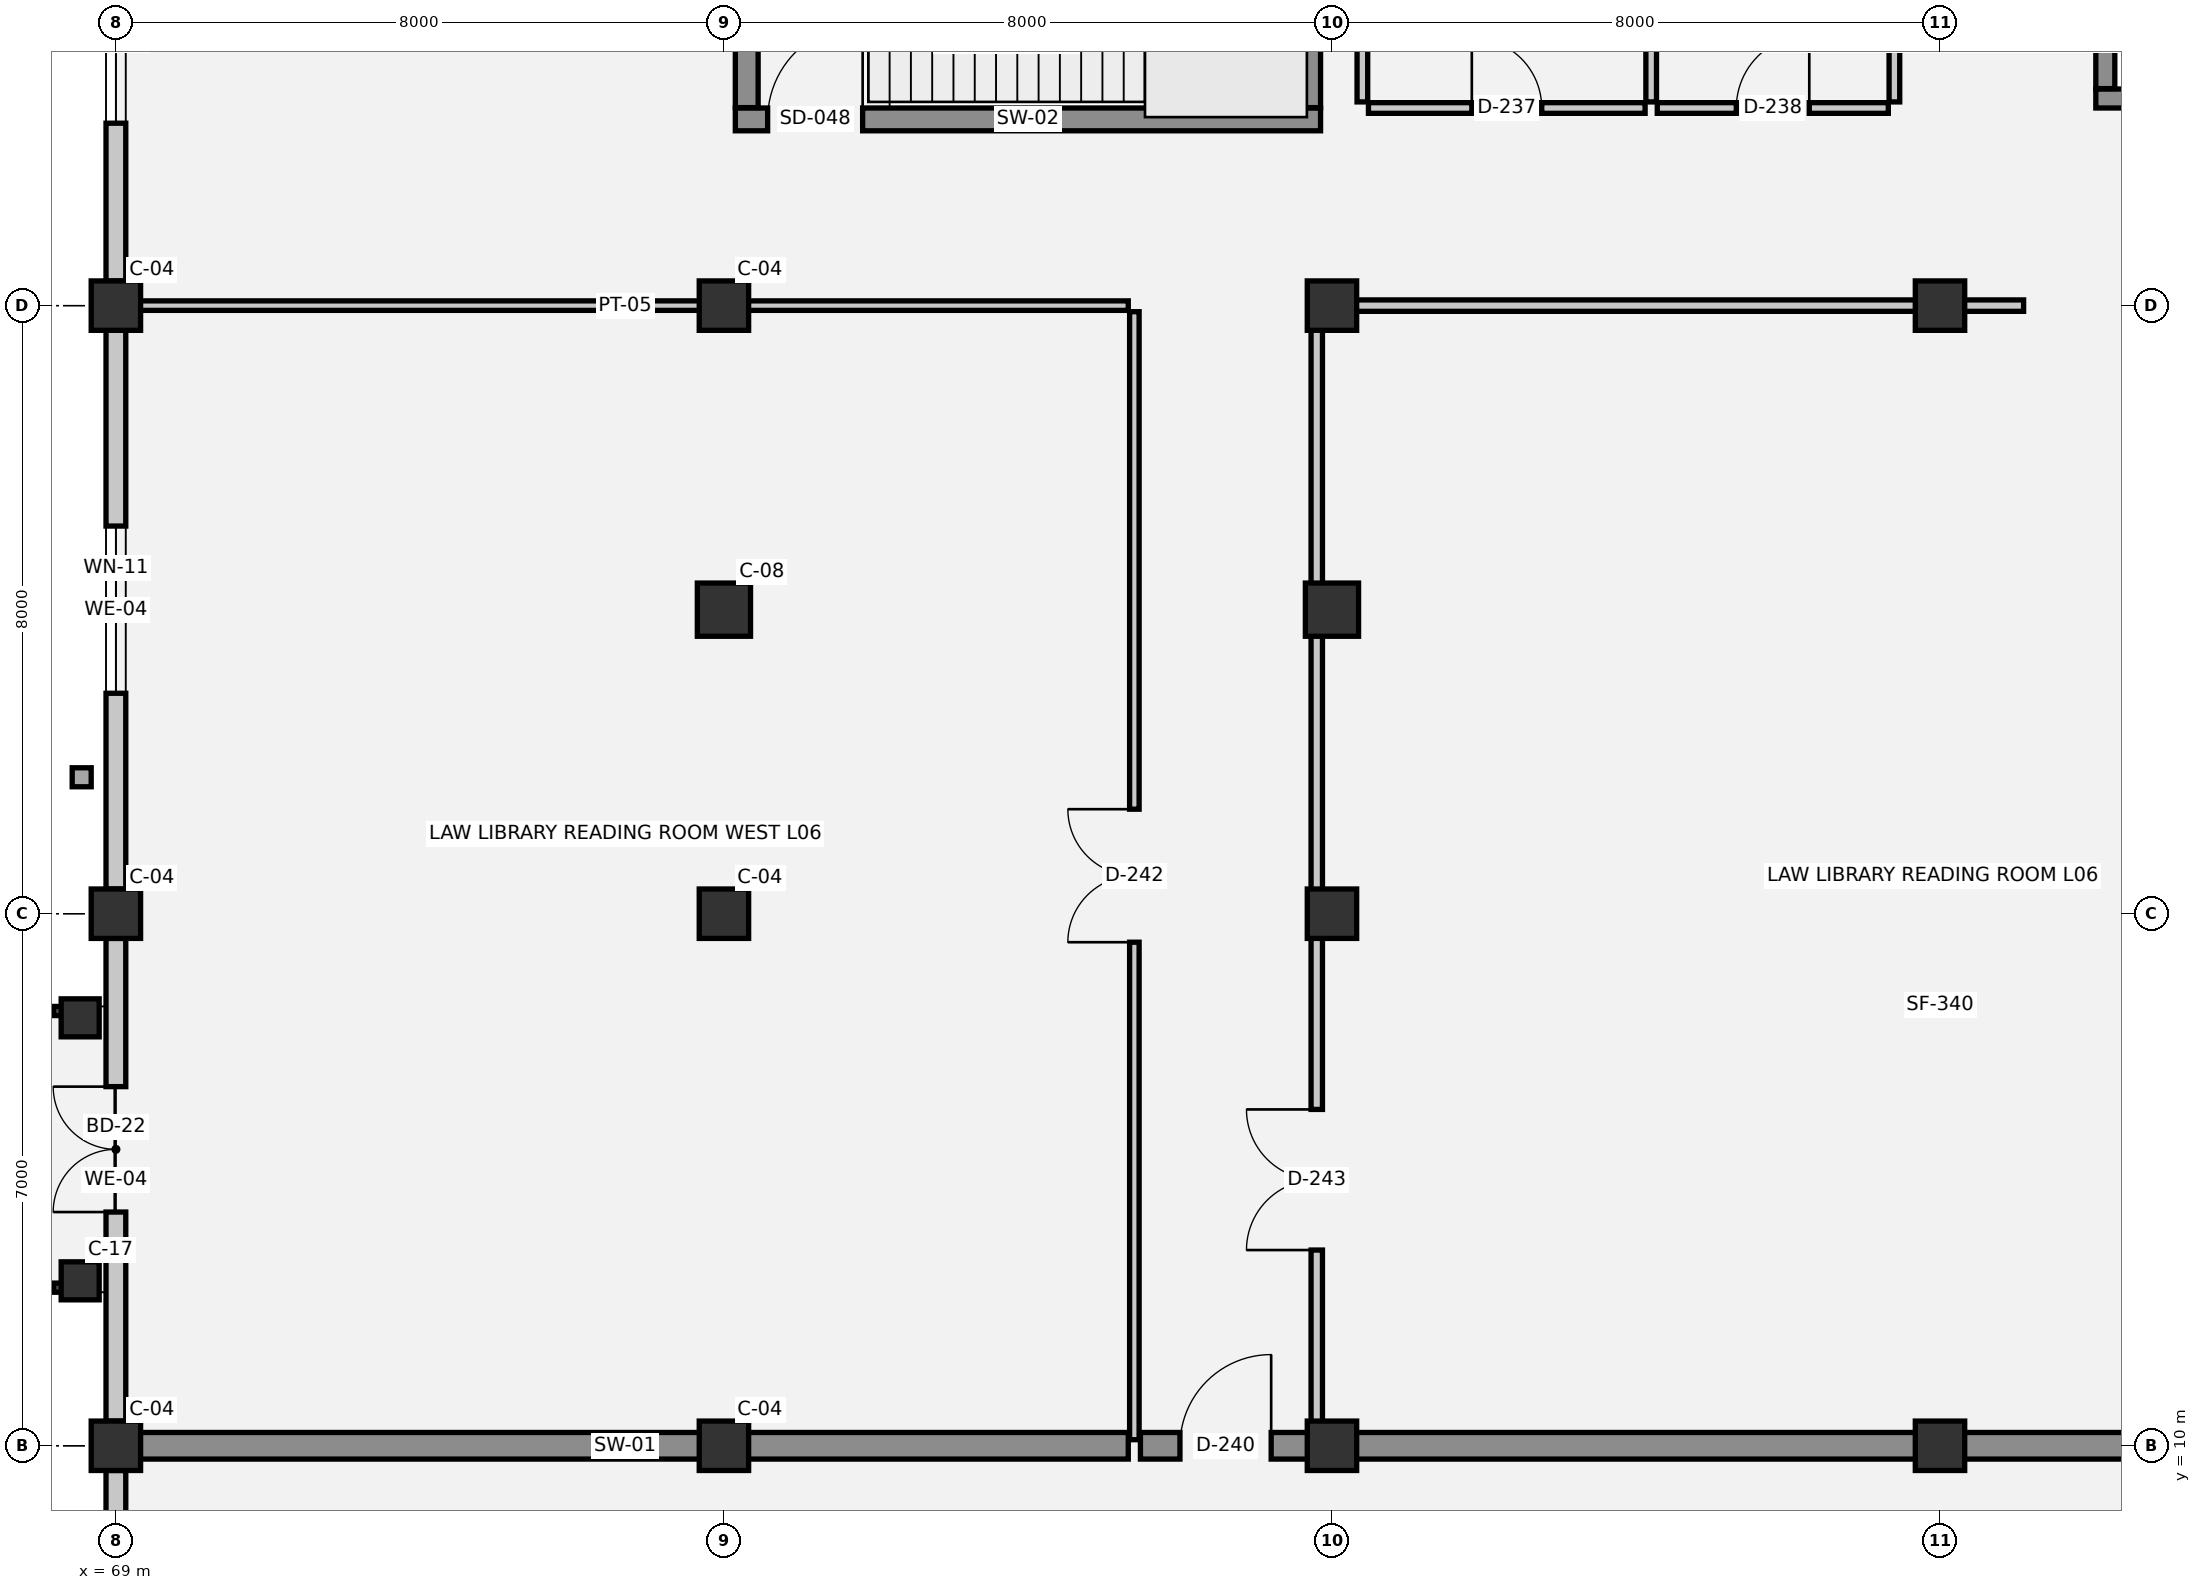
"""IFC4 building model, lengths in metres.
Left out: names, types, materials, properties, quantities, classifications, styles, units other than length and angle.
Written with IfcOpenShell. Run it as: python <this file> out.ifc"""

import sys

from ifc_helpers import new_model, si_unit, direction, frame, frame_2d, origin, origin_2d, place, context, subcontext, project, spatial, rectangle, circle, extrude, element, fill, save


model = new_model("IFC4")
c1 = context("Model", 3, precision=1e-05, world=origin(), true_north=direction((0.0, 1.0)))
c2 = subcontext(c1, "Body", "Model", "MODEL_VIEW")
j1 = project(units=[si_unit("LENGTHUNIT", "METRE"), si_unit("PLANEANGLEUNIT", "RADIAN")], contexts=[c1])
p1 = place(None, origin())
s1 = spatial("IfcSite", under=j1, at=p1, CompositionType="ELEMENT")
p2 = place(p1, origin())
s2 = spatial("IfcBuilding", under=s1, at=p2, CompositionType="ELEMENT")
p3 = place(p2, frame((0.0, 0.0, 9.9)))
s3 = spatial("IfcBuildingStorey", under=s2, at=p3, CompositionType="ELEMENT", Elevation=9.9)
for number, where, z_axis, x_axis in (
    (1, (69.0, 10.0, 0.0), (0.0, 0.0, 1.0), (1.0, 0.0, 0.0)),
    (2, (69.0, 17.0, 0.0), (0.0, 0.0, 1.0), (1.0, 0.0, 0.0)),
    (3, (69.0, 25.0, 0.0), (0.0, 0.0, 1.0), (1.0, 0.0, 0.0)),
    (4, (77.0, 10.0, 0.0), (0.0, 0.0, 1.0), (1.0, 0.0, 0.0)),
    (5, (77.0, 17.0, 0.0), (0.0, 0.0, 1.0), (1.0, 0.0, 0.0)),
    (6, (77.0, 25.0, 0.0), (0.0, 0.0, 1.0), (1.0, 0.0, 0.0)),
    (7, (85.0, 10.0, 0.0), (0.0, 0.0, 1.0), (1.0, 0.0, 0.0)),
    (8, (85.0, 17.0, 0.0), (0.0, 0.0, 1.0), (1.0, 0.0, 0.0)),
    (9, (85.0, 25.0, 0.0), (0.0, 0.0, 1.0), (1.0, 0.0, 0.0)),
    (10, (93.0, 10.0, 0.0), (0.0, 0.0, 1.0), (1.0, 0.0, 0.0)),
    (11, (93.0, 25.0, 0.0), (0.0, 0.0, 1.0), (1.0, 0.0, 0.0)),
):
    element("IfcColumn", number, at=place(p3, frame(where, z_axis=z_axis, x_axis=x_axis)), inside=s3, PredefinedType="COLUMN", context=c2, shape_type="SweptSolid", body=[
        extrude(rectangle(XDim=0.65, YDim=0.65, at=origin_2d()), origin(), (0.0, 0.0, 1.0), 4.5),
    ])
for number, where, z_axis, x_axis in (
    (12, (77.0, 21.0, 0.0), (0.0, 0.0, 1.0), (1.0, 0.0, 0.0)),
    (13, (85.0, 21.0, 0.0), (0.0, 0.0, 1.0), (1.0, 0.0, 0.0)),
):
    element("IfcColumn", number, at=place(p3, frame(where, z_axis=z_axis, x_axis=x_axis)), inside=s3, PredefinedType="COLUMN", context=c2, shape_type="SweptSolid", body=[
        extrude(circle(Radius=0.35, at=origin_2d()), origin(), (0.0, 0.0, 1.0), 4.5),
    ])
for number, where, z_axis, x_axis in (
    (14, (68.53, 12.17, 0.0), (0.0, 0.0, 1.0), (1.0, 0.0, 0.0)),
    (15, (68.53, 15.63, 0.0), (0.0, 0.0, 1.0), (1.0, 0.0, 0.0)),
):
    element("IfcColumn", number, at=place(p3, frame(where, z_axis=z_axis, x_axis=x_axis)), inside=s3, PredefinedType="COLUMN", context=c2, shape_type="SweptSolid", body=[
        extrude(rectangle(XDim=0.5, YDim=0.5, at=origin_2d()), origin(), (0.0, 0.0, 1.0), 4.27),
    ])
p4 = place(p3, frame((69.0, 4.325, 0.0), z_axis=(0.0, 0.0, 1.0), x_axis=(0.0, 1.0, 0.0)))
e16 = element("IfcWall", 16, at=p4, inside=s3, PredefinedType="SOLIDWALL", context=c2, shape_type="SweptSolid", body=[
    extrude(rectangle(XDim=5.35, YDim=0.26, at=frame_2d((2.675, 0.0))), origin(), (0.0, 0.0, 1.0), 3.44),
])
p5 = place(p4, frame((1.7, 0.0, 0.9)))
e17 = element("IfcOpeningElement", 17, at=p5, cuts=e16, PredefinedType="OPENING", context=c2, shape_type="SweptSolid", body=[
    extrude(rectangle(XDim=1.95, YDim=1.85, at=frame_2d((0.975, 0.925))), frame((0.0, 0.14, 0.0), z_axis=(0.0, -1.0, 0.0), x_axis=(1.0, 0.0, 0.0)), (0.0, 0.0, 1.0), 0.28),
])
p6 = place(p3, frame((69.0, 10.325, 0.0), z_axis=(0.0, 0.0, 1.0), x_axis=(0.0, 1.0, 0.0)))
e18 = element("IfcWall", 18, at=p6, inside=s3, PredefinedType="SOLIDWALL", context=c2, shape_type="SweptSolid", body=[
    extrude(rectangle(XDim=6.35, YDim=0.26, at=frame_2d((3.175, 0.0))), origin(), (0.0, 0.0, 1.0), 3.44),
])
p7 = place(p6, frame((2.75, 0.0, 0.0)))
e19 = element("IfcOpeningElement", 19, at=p7, cuts=e18, PredefinedType="OPENING", context=c2, shape_type="SweptSolid", body=[
    extrude(rectangle(XDim=1.65, YDim=2.2, at=frame_2d((0.825, 1.1))), frame((0.0, 0.14, 0.0), z_axis=(0.0, -1.0, 0.0), x_axis=(1.0, 0.0, 0.0)), (0.0, 0.0, 1.0), 0.28),
])
p8 = place(p3, frame((69.0, 17.325, 0.0), z_axis=(0.0, 0.0, 1.0), x_axis=(0.0, 1.0, 0.0)))
e20 = element("IfcWall", 20, at=p8, inside=s3, PredefinedType="SOLIDWALL", context=c2, shape_type="SweptSolid", body=[
    extrude(rectangle(XDim=7.35, YDim=0.26, at=frame_2d((3.675, 0.0))), origin(), (0.0, 0.0, 1.0), 3.44),
])
p9 = place(p8, frame((2.575, 0.0, 0.9)))
e21 = element("IfcOpeningElement", 21, at=p9, cuts=e20, PredefinedType="OPENING", context=c2, shape_type="SweptSolid", body=[
    extrude(rectangle(XDim=2.2, YDim=1.9, at=frame_2d((1.1, 0.95))), frame((0.0, 0.14, 0.0), z_axis=(0.0, -1.0, 0.0), x_axis=(1.0, 0.0, 0.0)), (0.0, 0.0, 1.0), 0.28),
])
p10 = place(p3, frame((69.0, 25.325, 0.0), z_axis=(0.0, 0.0, 1.0), x_axis=(0.0, 1.0, 0.0)))
e22 = element("IfcWall", 22, at=p10, inside=s3, PredefinedType="SOLIDWALL", context=c2, shape_type="SweptSolid", body=[
    extrude(rectangle(XDim=6.35, YDim=0.26, at=frame_2d((3.175, 0.0))), origin(), (0.0, 0.0, 1.0), 3.44),
])
p11 = place(p10, frame((2.075, 0.0, 0.9)))
e23 = element("IfcOpeningElement", 23, at=p11, cuts=e22, PredefinedType="OPENING", context=c2, shape_type="SweptSolid", body=[
    extrude(rectangle(XDim=2.2, YDim=1.9, at=frame_2d((1.1, 0.95))), frame((0.0, 0.14, 0.0), z_axis=(0.0, -1.0, 0.0), x_axis=(1.0, 0.0, 0.0)), (0.0, 0.0, 1.0), 0.28),
])
p12 = place(p3, frame((95.05, 27.725, 0.0), z_axis=(0.0, 0.0, 1.0), x_axis=(1.0, 0.0, 0.0)))
e24 = element("IfcWall", 24, at=p12, inside=s3, PredefinedType="SHEAR", context=c2, shape_type="SweptSolid", body=[
    extrude(rectangle(XDim=2.9, YDim=0.25, at=frame_2d((1.45, 0.0))), origin(), (0.0, 0.0, 1.0), 4.5),
])
p13 = place(p12, frame((0.9, 0.0, 0.0)))
e25 = element("IfcOpeningElement", 25, at=p13, cuts=e24, PredefinedType="OPENING", context=c2, shape_type="SweptSolid", body=[
    extrude(rectangle(XDim=1.1, YDim=2.15, at=frame_2d((0.55, 1.075))), frame((0.0, 0.135, 0.0), z_axis=(0.0, -1.0, 0.0), x_axis=(1.0, 0.0, 0.0)), (0.0, 0.0, 1.0), 0.27),
])
p14 = place(p3, frame((95.175, 30.545, 0.0), z_axis=(0.0, 0.0, 1.0), x_axis=(0.0, -1.0, 0.0)))
e26 = element("IfcWall", 26, at=p14, inside=s3, PredefinedType="SHEAR", context=c2, shape_type="SweptSolid", body=[
    extrude(rectangle(XDim=2.69, YDim=0.25, at=frame_2d((1.345, 0.0))), origin(), (0.0, 0.0, 1.0), 4.5),
])
p15 = place(p3, frame((77.15, 27.45, 0.0), z_axis=(0.0, 0.0, 1.0), x_axis=(1.0, 0.0, 0.0)))
e27 = element("IfcWall", 27, at=p15, inside=s3, PredefinedType="SHEAR", context=c2, shape_type="SweptSolid", body=[
    extrude(rectangle(XDim=7.7, YDim=0.3, at=frame_2d((3.85, 0.0))), origin(), (0.0, 0.0, 1.0), 4.16),
])
p16 = place(p15, frame((0.425, 0.0, 0.0)))
e28 = element("IfcOpeningElement", 28, at=p16, cuts=e27, PredefinedType="OPENING", context=c2, shape_type="SweptSolid", body=[
    extrude(rectangle(XDim=1.25, YDim=2.15, at=frame_2d((0.625, 1.075))), frame((0.0, 0.16, 0.0), z_axis=(0.0, -1.0, 0.0), x_axis=(1.0, 0.0, 0.0)), (0.0, 0.0, 1.0), 0.32),
])
for number, where, z_axis, x_axis in (
    (29, (77.3, 31.805, 0.0), (0.0, 0.0, 1.0), (0.0, -1.0, 0.0)),
    (30, (84.7, 27.605, 0.0), (0.0, 0.0, 1.0), (0.0, 1.0, 0.0)),
):
    element("IfcWall", number, at=place(p3, frame(where, z_axis=z_axis, x_axis=x_axis)), inside=s3, PredefinedType="SHEAR", context=c2, shape_type="SweptSolid", body=[
        extrude(rectangle(XDim=4.2, YDim=0.3, at=frame_2d((2.1, 0.0))), origin(), (0.0, 0.0, 1.0), 4.16),
    ])
p17 = place(p3, frame((69.08, 10.0, 0.0), z_axis=(0.0, 0.0, 1.0), x_axis=(1.0, 0.0, 0.0)))
e31 = element("IfcWall", 31, at=p17, inside=s3, PredefinedType="SHEAR", context=c2, shape_type="SweptSolid", body=[
    extrude(rectangle(XDim=13.24, YDim=0.35, at=frame_2d((6.62, 0.0))), origin(), (0.0, 0.0, 1.0), 4.14),
])
p18 = place(p3, frame((82.48, 10.0, 0.0), z_axis=(0.0, 0.0, 1.0), x_axis=(1.0, 0.0, 0.0)))
e32 = element("IfcWall", 32, at=p18, inside=s3, PredefinedType="SHEAR", context=c2, shape_type="SweptSolid", body=[
    extrude(rectangle(XDim=2.24, YDim=0.35, at=frame_2d((1.12, 0.0))), origin(), (0.0, 0.0, 1.0), 4.14),
])
p19 = place(p18, frame((0.52, 0.0, 0.0)))
e33 = element("IfcOpeningElement", 33, at=p19, cuts=e32, PredefinedType="OPENING", context=c2, shape_type="SweptSolid", body=[
    extrude(rectangle(XDim=1.2, YDim=2.15, at=frame_2d((0.6, 1.075))), frame((0.0, 0.185, 0.0), z_axis=(0.0, -1.0, 0.0), x_axis=(1.0, 0.0, 0.0)), (0.0, 0.0, 1.0), 0.37),
])
p20 = place(p3, frame((84.88, 10.0, 0.0), z_axis=(0.0, 0.0, 1.0), x_axis=(1.0, 0.0, 0.0)))
e34 = element("IfcWall", 34, at=p20, inside=s3, PredefinedType="SHEAR", context=c2, shape_type="SweptSolid", body=[
    extrude(rectangle(XDim=16.04, YDim=0.35, at=frame_2d((8.02, 0.0))), origin(), (0.0, 0.0, 1.0), 4.14),
])
p21 = place(p3, frame((69.08, 25.0, 0.0), z_axis=(0.0, 0.0, 1.0), x_axis=(1.0, 0.0, 0.0)))
e35 = element("IfcWall", 35, at=p21, inside=s3, PredefinedType="PARTITIONING", context=c2, shape_type="SweptSolid", body=[
    extrude(rectangle(XDim=13.24, YDim=0.125, at=frame_2d((6.62, 0.0))), origin(), (0.0, 0.0, 1.0), 3.56),
])
p22 = place(p3, frame((84.88, 25.0, 0.0), z_axis=(0.0, 0.0, 1.0), x_axis=(1.0, 0.0, 0.0)))
e36 = element("IfcWall", 36, at=p22, inside=s3, PredefinedType="PARTITIONING", context=c2, shape_type="SweptSolid", body=[
    extrude(rectangle(XDim=9.22, YDim=0.15, at=frame_2d((4.61, 0.0))), origin(), (0.0, 0.0, 1.0), 3.56),
])
p23 = place(p3, frame((85.48, 27.6, 0.0), z_axis=(0.0, 0.0, 1.0), x_axis=(1.0, 0.0, 0.0)))
e37 = element("IfcWall", 37, at=p23, inside=s3, PredefinedType="PLUMBINGWALL", context=c2, shape_type="SweptSolid", body=[
    extrude(rectangle(XDim=3.64, YDim=0.14, at=frame_2d((1.82, 0.0))), origin(), (0.0, 0.0, 1.0), 4.14),
])
p24 = place(p23, frame((1.36, 0.0, 0.0)))
e38 = element("IfcOpeningElement", 38, at=p24, cuts=e37, PredefinedType="OPENING", context=c2, shape_type="SweptSolid", body=[
    extrude(rectangle(XDim=0.92, YDim=2.1, at=frame_2d((0.46, 1.05))), frame((0.0, 0.08, 0.0), z_axis=(0.0, -1.0, 0.0), x_axis=(1.0, 0.0, 0.0)), (0.0, 0.0, 1.0), 0.16),
])
p25 = place(p3, frame((89.28, 27.6, 0.0), z_axis=(0.0, 0.0, 1.0), x_axis=(1.0, 0.0, 0.0)))
e39 = element("IfcWall", 39, at=p25, inside=s3, PredefinedType="PLUMBINGWALL", context=c2, shape_type="SweptSolid", body=[
    extrude(rectangle(XDim=3.04, YDim=0.14, at=frame_2d((1.52, 0.0))), origin(), (0.0, 0.0, 1.0), 4.14),
])
p26 = place(p25, frame((1.04, 0.0, 0.0)))
e40 = element("IfcOpeningElement", 40, at=p26, cuts=e39, PredefinedType="OPENING", context=c2, shape_type="SweptSolid", body=[
    extrude(rectangle(XDim=0.96, YDim=2.1, at=frame_2d((0.48, 1.05))), frame((0.0, 0.08, 0.0), z_axis=(0.0, -1.0, 0.0), x_axis=(1.0, 0.0, 0.0)), (0.0, 0.0, 1.0), 0.16),
])
p27 = place(p3, frame((82.4, 10.08, 0.0), z_axis=(0.0, 0.0, 1.0), x_axis=(0.0, 1.0, 0.0)))
e41 = element("IfcWall", 41, at=p27, inside=s3, PredefinedType="PARTITIONING", context=c2, shape_type="SweptSolid", body=[
    extrude(rectangle(XDim=14.84, YDim=0.125, at=frame_2d((7.42, 0.0))), origin(), (0.0, 0.0, 1.0), 4.14),
])
p28 = place(p27, frame((6.545, 0.0, 0.0)))
e42 = element("IfcOpeningElement", 42, at=p28, cuts=e41, PredefinedType="OPENING", context=c2, shape_type="SweptSolid", body=[
    extrude(rectangle(XDim=1.75, YDim=2.3, at=frame_2d((0.875, 1.15))), frame((0.0, 0.073, 0.0), z_axis=(0.0, -1.0, 0.0), x_axis=(1.0, 0.0, 0.0)), (0.0, 0.0, 1.0), 0.145),
])
p29 = place(p3, frame((84.8, 10.08, 0.0), z_axis=(0.0, 0.0, 1.0), x_axis=(0.0, 1.0, 0.0)))
e43 = element("IfcWall", 43, at=p29, inside=s3, PredefinedType="PARTITIONING", context=c2, shape_type="SweptSolid", body=[
    extrude(rectangle(XDim=14.84, YDim=0.15, at=frame_2d((7.42, 0.0))), origin(), (0.0, 0.0, 1.0), 3.61),
])
p30 = place(p29, frame((2.495, 0.0, 0.0)))
e44 = element("IfcOpeningElement", 44, at=p30, cuts=e43, PredefinedType="OPENING", context=c2, shape_type="SweptSolid", body=[
    extrude(rectangle(XDim=1.85, YDim=2.3, at=frame_2d((0.925, 1.15))), frame((0.0, 0.085, 0.0), z_axis=(0.0, -1.0, 0.0), x_axis=(1.0, 0.0, 0.0)), (0.0, 0.0, 1.0), 0.17),
])
for number, where, z_axis, x_axis in (
    (45, (85.4, 27.68, 0.0), (0.0, 0.0, 1.0), (0.0, 1.0, 0.0)),
    (46, (89.2, 27.68, 0.0), (0.0, 0.0, 1.0), (0.0, 1.0, 0.0)),
    (47, (92.4, 27.68, 0.0), (0.0, 0.0, 1.0), (0.0, 1.0, 0.0)),
):
    element("IfcWall", number, at=place(p3, frame(where, z_axis=z_axis, x_axis=x_axis)), inside=s3, PredefinedType="PLUMBINGWALL", context=c2, shape_type="SweptSolid", body=[
        extrude(rectangle(XDim=4.24, YDim=0.14, at=frame_2d((2.12, 0.0))), origin(), (0.0, 0.0, 1.0), 4.14),
    ])
p31 = place(p7, origin())
e48 = element("IfcDoor", 48, at=p31, inside=s3, OperationType="DOUBLE_DOOR_SINGLE_SWING", PredefinedType="DOOR", context=c2, shape_type="SweptSolid", body=[
    extrude(rectangle(XDim=1.65, YDim=2.2, at=frame_2d((0.825, 1.1))), frame((0.0, 0.025, 0.0), z_axis=(0.0, -1.0, 0.0), x_axis=(1.0, 0.0, 0.0)), (0.0, 0.0, 1.0), 0.05),
])
fill(e19, e48)
p32 = place(p9, origin())
e49 = element("IfcWindow", 49, at=p32, inside=s3, PartitioningType="SINGLE_PANEL", PredefinedType="WINDOW", context=c2, shape_type="SweptSolid", body=[
    extrude(rectangle(XDim=2.2, YDim=1.9, at=frame_2d((1.1, 0.95))), frame((0.0, 0.03, 0.0), z_axis=(0.0, -1.0, 0.0), x_axis=(1.0, 0.0, 0.0)), (0.0, 0.0, 1.0), 0.06),
])
fill(e21, e49)
p33 = place(p11, origin())
e50 = element("IfcWindow", 50, at=p33, inside=s3, PartitioningType="SINGLE_PANEL", PredefinedType="WINDOW", context=c2, shape_type="SweptSolid", body=[
    extrude(rectangle(XDim=2.2, YDim=1.9, at=frame_2d((1.1, 0.95))), frame((0.0, 0.03, 0.0), z_axis=(0.0, -1.0, 0.0), x_axis=(1.0, 0.0, 0.0)), (0.0, 0.0, 1.0), 0.06),
])
fill(e23, e50)
p34 = place(p16, origin())
e51 = element("IfcDoor", 51, at=p34, inside=s3, OperationType="SINGLE_SWING_RIGHT", PredefinedType="DOOR", context=c2, shape_type="SweptSolid", body=[
    extrude(rectangle(XDim=1.25, YDim=2.15, at=frame_2d((0.625, 1.075))), frame((0.0, 0.025, 0.0), z_axis=(0.0, -1.0, 0.0), x_axis=(1.0, 0.0, 0.0)), (0.0, 0.0, 1.0), 0.05),
])
fill(e28, e51)
p35 = place(p24, origin())
e52 = element("IfcDoor", 52, at=p35, inside=s3, OperationType="SINGLE_SWING_LEFT", PredefinedType="DOOR", context=c2, shape_type="SweptSolid", body=[
    extrude(rectangle(XDim=0.92, YDim=2.1, at=frame_2d((0.46, 1.05))), frame((0.0, 0.025, 0.0), z_axis=(0.0, -1.0, 0.0), x_axis=(1.0, 0.0, 0.0)), (0.0, 0.0, 1.0), 0.05),
])
fill(e38, e52)
p36 = place(p26, origin())
e53 = element("IfcDoor", 53, at=p36, inside=s3, OperationType="SINGLE_SWING_RIGHT", PredefinedType="DOOR", context=c2, shape_type="SweptSolid", body=[
    extrude(rectangle(XDim=0.96, YDim=2.1, at=frame_2d((0.48, 1.05))), frame((0.0, 0.025, 0.0), z_axis=(0.0, -1.0, 0.0), x_axis=(1.0, 0.0, 0.0)), (0.0, 0.0, 1.0), 0.05),
])
fill(e40, e53)
p37 = place(p19, origin())
e54 = element("IfcDoor", 54, at=p37, inside=s3, OperationType="SINGLE_SWING_RIGHT", PredefinedType="DOOR", context=c2, shape_type="SweptSolid", body=[
    extrude(rectangle(XDim=1.2, YDim=2.15, at=frame_2d((0.6, 1.075))), frame((0.0, 0.025, 0.0), z_axis=(0.0, -1.0, 0.0), x_axis=(1.0, 0.0, 0.0)), (0.0, 0.0, 1.0), 0.05),
])
fill(e33, e54)
p38 = place(p28, origin())
e55 = element("IfcDoor", 55, at=p38, inside=s3, OperationType="DOUBLE_DOOR_SINGLE_SWING", PredefinedType="DOOR", context=c2, shape_type="SweptSolid", body=[
    extrude(rectangle(XDim=1.75, YDim=2.3, at=frame_2d((0.875, 1.15))), frame((0.0, 0.025, 0.0), z_axis=(0.0, -1.0, 0.0), x_axis=(1.0, 0.0, 0.0)), (0.0, 0.0, 1.0), 0.05),
])
fill(e42, e55)
p39 = place(p30, origin())
e56 = element("IfcDoor", 56, at=p39, inside=s3, OperationType="DOUBLE_DOOR_SINGLE_SWING", PredefinedType="DOOR", context=c2, shape_type="SweptSolid", body=[
    extrude(rectangle(XDim=1.85, YDim=2.3, at=frame_2d((0.925, 1.15))), frame((0.0, 0.025, 0.0), z_axis=(0.0, -1.0, 0.0), x_axis=(1.0, 0.0, 0.0)), (0.0, 0.0, 1.0), 0.05),
])
fill(e44, e56)
save(model, sys.argv[1])
